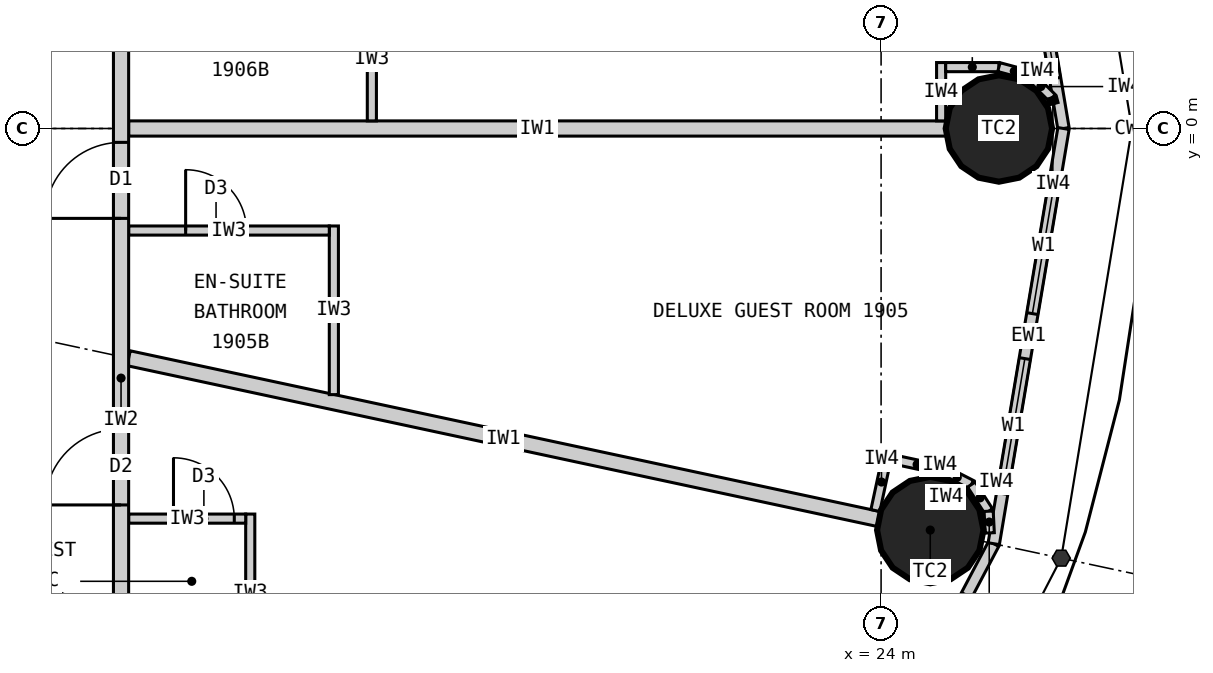
"""IFC4 building model, lengths in metres.
Left out: names, types, materials, properties, quantities, classifications, styles, units other than length and angle.
Written with IfcOpenShell. Run it as: python <this file> out.ifc"""

import sys

from ifc_helpers import new_model, si_unit, direction, frame, frame_2d, origin, origin_2d, place, context, subcontext, project, spatial, rectangle, circle, extrude, element, fill, save


model = new_model("IFC4")
c1 = context("Model", 3, precision=1e-05, world=origin(), true_north=direction((0.0, 1.0)))
c2 = subcontext(c1, "Body", "Model", "MODEL_VIEW")
j1 = project(units=[si_unit("LENGTHUNIT", "METRE"), si_unit("PLANEANGLEUNIT", "RADIAN")], contexts=[c1])
p1 = place(None, origin())
s1 = spatial("IfcSite", under=j1, at=p1, CompositionType="ELEMENT")
p2 = place(p1, origin())
s2 = spatial("IfcBuilding", under=s1, at=p2, CompositionType="ELEMENT")
p3 = place(p2, frame((0.0, 0.0, 77.1)))
s3 = spatial("IfcBuildingStorey", under=s2, at=p3, CompositionType="ELEMENT", Elevation=77.1)
for number, where, z_axis, x_axis in (
    (1, (25.55, 0.0, 0.0), (0.0, 0.0, 1.0), (1.0, 0.0, 0.0)),
    (2, (24.647, -5.283, 0.0), (0.0, 0.0, 1.0), (1.0, 0.0, 0.0)),
):
    element("IfcColumn", number, at=place(p3, frame(where, z_axis=z_axis, x_axis=x_axis)), inside=s3, PredefinedType="COLUMN", context=c2, shape_type="SweptSolid", body=[
        extrude(circle(Radius=0.7, at=origin_2d()), origin(), (0.0, 0.0, 1.0), 3.3),
    ])
p4 = place(p3, frame((26.4, 0.0, 0.0), z_axis=(0.0, 0.0, 1.0), x_axis=(-0.165642551694, 0.986185857264, 0.0)))
e3 = element("IfcWall", 3, at=p4, inside=s3, PredefinedType="ELEMENTEDWALL", context=c2, shape_type="SweptSolid", body=[
    extrude(rectangle(XDim=5.539, YDim=0.15, at=frame_2d((2.77, 0.0))), origin(), (0.0, 0.0, 1.0), 3.12),
])
p5 = place(p4, frame((0.669, 0.0, 0.9)))
e4 = element("IfcOpeningElement", 4, at=p5, cuts=e3, PredefinedType="OPENING", context=c2, shape_type="SweptSolid", body=[
    extrude(rectangle(XDim=1.8, YDim=1.9, at=frame_2d((0.9, 0.95))), frame((0.0, 0.085, 0.0), z_axis=(0.0, -1.0, 0.0), x_axis=(1.0, 0.0, 0.0)), (0.0, 0.0, 1.0), 0.17),
])
p6 = place(p4, frame((3.07, 0.0, 0.9)))
e5 = element("IfcOpeningElement", 5, at=p6, cuts=e3, PredefinedType="OPENING", context=c2, shape_type="SweptSolid", body=[
    extrude(rectangle(XDim=1.8, YDim=1.9, at=frame_2d((0.9, 0.95))), frame((0.0, 0.085, 0.0), z_axis=(0.0, -1.0, 0.0), x_axis=(1.0, 0.0, 0.0)), (0.0, 0.0, 1.0), 0.17),
])
p7 = place(p3, frame((22.803, -10.532, 0.0), z_axis=(0.0, 0.0, 1.0), x_axis=(0.467296867008, 0.884100468321, 0.0)))
e6 = element("IfcWall", 6, at=p7, inside=s3, PredefinedType="ELEMENTEDWALL", context=c2, shape_type="SweptSolid", body=[
    extrude(rectangle(XDim=5.734, YDim=0.15, at=frame_2d((2.867, 0.0))), origin(), (0.0, 0.0, 1.0), 3.12),
])
p8 = place(p7, frame((0.767, 0.0, 0.9)))
e7 = element("IfcOpeningElement", 7, at=p8, cuts=e6, PredefinedType="OPENING", context=c2, shape_type="SweptSolid", body=[
    extrude(rectangle(XDim=1.8, YDim=1.9, at=frame_2d((0.9, 0.95))), frame((0.0, 0.085, 0.0), z_axis=(0.0, -1.0, 0.0), x_axis=(1.0, 0.0, 0.0)), (0.0, 0.0, 1.0), 0.17),
])
p9 = place(p7, frame((3.167, 0.0, 0.9)))
e8 = element("IfcOpeningElement", 8, at=p9, cuts=e6, PredefinedType="OPENING", context=c2, shape_type="SweptSolid", body=[
    extrude(rectangle(XDim=1.8, YDim=1.9, at=frame_2d((0.9, 0.95))), frame((0.0, 0.085, 0.0), z_axis=(0.0, -1.0, 0.0), x_axis=(1.0, 0.0, 0.0)), (0.0, 0.0, 1.0), 0.17),
])
p10 = place(p3, frame((25.482, -5.462, 0.0), z_axis=(0.0, 0.0, 1.0), x_axis=(0.165642551694, 0.986185857264, 0.0)))
e9 = element("IfcWall", 9, at=p10, inside=s3, PredefinedType="ELEMENTEDWALL", context=c2, shape_type="SweptSolid", body=[
    extrude(rectangle(XDim=5.539, YDim=0.15, at=frame_2d((2.77, 0.0))), origin(), (0.0, 0.0, 1.0), 3.12),
])
p11 = place(p10, frame((0.669, 0.0, 0.9)))
e10 = element("IfcOpeningElement", 10, at=p11, cuts=e9, PredefinedType="OPENING", context=c2, shape_type="SweptSolid", body=[
    extrude(rectangle(XDim=1.8, YDim=1.9, at=frame_2d((0.9, 0.95))), frame((0.0, 0.085, 0.0), z_axis=(0.0, -1.0, 0.0), x_axis=(1.0, 0.0, 0.0)), (0.0, 0.0, 1.0), 0.17),
])
p12 = place(p10, frame((3.07, 0.0, 0.9)))
e11 = element("IfcOpeningElement", 11, at=p12, cuts=e9, PredefinedType="OPENING", context=c2, shape_type="SweptSolid", body=[
    extrude(rectangle(XDim=1.8, YDim=1.9, at=frame_2d((0.9, 0.95))), frame((0.0, 0.085, 0.0), z_axis=(0.0, -1.0, 0.0), x_axis=(1.0, 0.0, 0.0)), (0.0, 0.0, 1.0), 0.17),
])
p13 = place(p3, frame((14.1, 0.0, 0.0), z_axis=(0.0, 0.0, 1.0), x_axis=(1.0, 0.0, 0.0)))
e12 = element("IfcWall", 12, at=p13, inside=s3, PredefinedType="PARTITIONING", context=c2, shape_type="SweptSolid", body=[
    extrude(rectangle(XDim=10.75, YDim=0.2, at=frame_2d((5.375, 0.0))), origin(), (0.0, 0.0, 1.0), 2.27),
])
p14 = place(p3, frame((14.1, -3.022, 0.0), z_axis=(0.0, 0.0, 1.0), x_axis=(0.977790014929, -0.209586943072, 0.0)))
e13 = element("IfcWall", 13, at=p14, inside=s3, PredefinedType="PARTITIONING", context=c2, shape_type="SweptSolid", body=[
    extrude(rectangle(XDim=10.087, YDim=0.2, at=frame_2d((5.043, 0.0))), origin(), (0.0, 0.0, 1.0), 2.32),
])
p15 = place(p3, frame((15.7, -7.152, 0.0), z_axis=(0.0, 0.0, 1.0), x_axis=(0.0, 1.0, 0.0)))
e14 = element("IfcWall", 14, at=p15, inside=s3, PredefinedType="PARTITIONING", context=c2, shape_type="SweptSolid", body=[
    extrude(rectangle(XDim=2.079, YDim=0.12, at=frame_2d((1.04, 0.0))), origin(), (0.0, 0.0, 1.0), 3.12),
])
p16 = place(p3, frame((14.1, -5.133, 0.0), z_axis=(0.0, 0.0, 1.0), x_axis=(1.0, 0.0, 0.0)))
e15 = element("IfcWall", 15, at=p16, inside=s3, PredefinedType="PARTITIONING", context=c2, shape_type="SweptSolid", body=[
    extrude(rectangle(XDim=1.54, YDim=0.12, at=frame_2d((0.77, 0.0))), origin(), (0.0, 0.0, 1.0), 3.12),
])
p17 = place(p16, frame((0.59, 0.0, 0.0)))
e16 = element("IfcOpeningElement", 16, at=p17, cuts=e15, PredefinedType="OPENING", context=c2, shape_type="SweptSolid", body=[
    extrude(rectangle(XDim=0.8, YDim=2.1, at=frame_2d((0.4, 1.05))), frame((0.0, 0.07, 0.0), z_axis=(0.0, -1.0, 0.0), x_axis=(1.0, 0.0, 0.0)), (0.0, 0.0, 1.0), 0.14),
])
p18 = place(p3, frame((16.8, -3.501, 0.0), z_axis=(0.0, 0.0, 1.0), x_axis=(0.0, 1.0, 0.0)))
e17 = element("IfcWall", 17, at=p18, inside=s3, PredefinedType="PARTITIONING", context=c2, shape_type="SweptSolid", body=[
    extrude(rectangle(XDim=2.219, YDim=0.12, at=frame_2d((1.109, 0.0))), origin(), (0.0, 0.0, 1.0), 3.12),
])
p19 = place(p3, frame((14.1, -1.343, 0.0), z_axis=(0.0, 0.0, 1.0), x_axis=(1.0, 0.0, 0.0)))
e18 = element("IfcWall", 18, at=p19, inside=s3, PredefinedType="PARTITIONING", context=c2, shape_type="SweptSolid", body=[
    extrude(rectangle(XDim=2.64, YDim=0.12, at=frame_2d((1.32, 0.0))), origin(), (0.0, 0.0, 1.0), 3.12),
])
p20 = place(p19, frame((0.75, 0.0, 0.0)))
e19 = element("IfcOpeningElement", 19, at=p20, cuts=e18, PredefinedType="OPENING", context=c2, shape_type="SweptSolid", body=[
    extrude(rectangle(XDim=0.8, YDim=2.1, at=frame_2d((0.4, 1.05))), frame((0.0, 0.07, 0.0), z_axis=(0.0, -1.0, 0.0), x_axis=(1.0, 0.0, 0.0)), (0.0, 0.0, 1.0), 0.14),
])
p21 = place(p3, frame((17.3, 0.1, 0.0), z_axis=(0.0, 0.0, 1.0), x_axis=(0.0, 1.0, 0.0)))
e20 = element("IfcWall", 20, at=p21, inside=s3, PredefinedType="PARTITIONING", context=c2, shape_type="SweptSolid", body=[
    extrude(rectangle(XDim=1.64, YDim=0.12, at=frame_2d((0.82, 0.0))), origin(), (0.0, 0.0, 1.0), 3.12),
])
p22 = place(p3, frame((14.0, -9.9, 0.0), z_axis=(0.0, 0.0, 1.0), x_axis=(0.0, 1.0, 0.0)))
e21 = element("IfcWall", 21, at=p22, inside=s3, PredefinedType="PARTITIONING", context=c2, shape_type="SweptSolid", body=[
    extrude(rectangle(XDim=13.232, YDim=0.2, at=frame_2d((6.616, 0.0))), origin(), (0.0, 0.0, 1.0), 3.12),
])
p23 = place(p22, frame((4.948, 0.0, 0.0)))
e22 = element("IfcOpeningElement", 22, at=p23, cuts=e21, PredefinedType="OPENING", context=c2, shape_type="SweptSolid", body=[
    extrude(rectangle(XDim=1.0, YDim=2.2, at=frame_2d((0.5, 1.1))), frame((0.0, 0.11, 0.0), z_axis=(0.0, -1.0, 0.0), x_axis=(1.0, 0.0, 0.0)), (0.0, 0.0, 1.0), 0.22),
])
p24 = place(p22, frame((8.718, 0.0, 0.0)))
e23 = element("IfcOpeningElement", 23, at=p24, cuts=e21, PredefinedType="OPENING", context=c2, shape_type="SweptSolid", body=[
    extrude(rectangle(XDim=1.0, YDim=2.2, at=frame_2d((0.5, 1.1))), frame((0.0, 0.11, 0.0), z_axis=(0.0, -1.0, 0.0), x_axis=(1.0, 0.0, 0.0)), (0.0, 0.0, 1.0), 0.22),
])
p25 = place(p22, frame((11.74, 0.0, 0.0)))
e24 = element("IfcOpeningElement", 24, at=p25, cuts=e21, PredefinedType="OPENING", context=c2, shape_type="SweptSolid", body=[
    extrude(rectangle(XDim=1.0, YDim=2.2, at=frame_2d((0.5, 1.1))), frame((0.0, 0.11, 0.0), z_axis=(0.0, -1.0, 0.0), x_axis=(1.0, 0.0, 0.0)), (0.0, 0.0, 1.0), 0.22),
])
p26 = place(p3, frame((24.79, 0.1, 0.0), z_axis=(0.0, 0.0, 1.0), x_axis=(0.0, 1.0, 0.0)))
e25 = element("IfcWall", 25, at=p26, inside=s3, PredefinedType="PARTITIONING", context=c2, shape_type="SweptSolid", body=[
    extrude(rectangle(XDim=0.767, YDim=0.12, at=frame_2d((0.384, 0.0))), origin(), (0.0, 0.0, 1.0), 3.12),
])
p27 = place(p3, frame((24.85, 0.808, 0.0), z_axis=(0.0, 0.0, 1.0), x_axis=(1.0, 0.0, 0.0)))
e26 = element("IfcWall", 26, at=p27, inside=s3, PredefinedType="PARTITIONING", context=c2, shape_type="SweptSolid", body=[
    extrude(rectangle(XDim=0.7, YDim=0.12, at=frame_2d((0.35, 0.0))), origin(), (0.0, 0.0, 1.0), 3.12),
])
p28 = place(p3, frame((25.55, 0.808, 0.0), z_axis=(0.0, 0.0, 1.0), x_axis=(0.965807183573, -0.2592614205, 0.0)))
e27 = element("IfcWall", 27, at=p28, inside=s3, PredefinedType="PARTITIONING", context=c2, shape_type="SweptSolid", body=[
    extrude(rectangle(XDim=0.418, YDim=0.12, at=frame_2d((0.209, 0.0))), origin(), (0.0, 0.0, 1.0), 3.12),
])
p29 = place(p3, frame((25.954, 0.699, 0.0), z_axis=(0.0, 0.0, 1.0), x_axis=(0.707106781187, -0.707106781187, 0.0)))
e28 = element("IfcWall", 28, at=p29, inside=s3, PredefinedType="PARTITIONING", context=c2, shape_type="SweptSolid", body=[
    extrude(rectangle(XDim=0.418, YDim=0.12, at=frame_2d((0.209, 0.0))), origin(), (0.0, 0.0, 1.0), 3.12),
])
p30 = place(p3, frame((26.249, 0.404, 0.0), z_axis=(0.0, 0.0, 1.0), x_axis=(0.259754282609, -0.965674744759, 0.0)))
e29 = element("IfcWall", 29, at=p30, inside=s3, PredefinedType="PARTITIONING", context=c2, shape_type="SweptSolid", body=[
    extrude(rectangle(XDim=0.08, YDim=0.12, at=frame_2d((0.04, 0.0))), origin(), (0.0, 0.0, 1.0), 3.12),
])
p31 = place(p3, frame((23.925, -5.026, 0.0), z_axis=(0.0, 0.0, 1.0), x_axis=(0.209681192172, 0.977769808109, 0.0)))
e30 = element("IfcWall", 30, at=p31, inside=s3, PredefinedType="PARTITIONING", context=c2, shape_type="SweptSolid", body=[
    extrude(rectangle(XDim=0.767, YDim=0.12, at=frame_2d((0.384, 0.0))), origin(), (0.0, 0.0, 1.0), 3.12),
])
p32 = place(p3, frame((24.132, -4.347, 0.0), z_axis=(0.0, 0.0, 1.0), x_axis=(0.977776882509, -0.209648200638, 0.0)))
e31 = element("IfcWall", 31, at=p32, inside=s3, PredefinedType="PARTITIONING", context=c2, shape_type="SweptSolid", body=[
    extrude(rectangle(XDim=0.7, YDim=0.12, at=frame_2d((0.35, 0.0))), origin(), (0.0, 0.0, 1.0), 3.12),
])
for number, where, z_axis, x_axis in (
    (32, (24.816, -4.494, 0.0), (0.0, 0.0, 1.0), (0.89, -0.455, 0.0)),
    (33, (25.188, -4.684, 0.0), (0.0, 0.0, 1.0), (0.543, -0.84, 0.0)),
):
    element("IfcWall", number, at=place(p3, frame(where, z_axis=z_axis, x_axis=x_axis)), inside=s3, PredefinedType="PARTITIONING", context=c2, shape_type="SweptSolid", body=[
        extrude(rectangle(XDim=0.418, YDim=0.12, at=frame_2d((0.209, 0.0))), origin(), (0.0, 0.0, 1.0), 3.12),
    ])
p33 = place(p3, frame((25.416, -5.035, 0.0), z_axis=(0.0, 0.0, 1.0), x_axis=(0.050406329159, -0.998728793007, 0.0)))
e34 = element("IfcWall", 34, at=p33, inside=s3, PredefinedType="PARTITIONING", context=c2, shape_type="SweptSolid", body=[
    extrude(rectangle(XDim=0.286, YDim=0.12, at=frame_2d((0.143, 0.0))), origin(), (0.0, 0.0, 1.0), 3.12),
])
p34 = place(p5, origin())
e35 = element("IfcWindow", 35, at=p34, inside=s3, PartitioningType="SINGLE_PANEL", PredefinedType="WINDOW", context=c2, shape_type="SweptSolid", body=[
    extrude(rectangle(XDim=1.8, YDim=1.9, at=frame_2d((0.9, 0.95))), frame((0.0, 0.03, 0.0), z_axis=(0.0, -1.0, 0.0), x_axis=(1.0, 0.0, 0.0)), (0.0, 0.0, 1.0), 0.06),
])
fill(e4, e35)
p35 = place(p11, origin())
e36 = element("IfcWindow", 36, at=p35, inside=s3, PartitioningType="SINGLE_PANEL", PredefinedType="WINDOW", context=c2, shape_type="SweptSolid", body=[
    extrude(rectangle(XDim=1.8, YDim=1.9, at=frame_2d((0.9, 0.95))), frame((0.0, 0.03, 0.0), z_axis=(0.0, -1.0, 0.0), x_axis=(1.0, 0.0, 0.0)), (0.0, 0.0, 1.0), 0.06),
])
fill(e10, e36)
p36 = place(p12, origin())
e37 = element("IfcWindow", 37, at=p36, inside=s3, PartitioningType="SINGLE_PANEL", PredefinedType="WINDOW", context=c2, shape_type="SweptSolid", body=[
    extrude(rectangle(XDim=1.8, YDim=1.9, at=frame_2d((0.9, 0.95))), frame((0.0, 0.03, 0.0), z_axis=(0.0, -1.0, 0.0), x_axis=(1.0, 0.0, 0.0)), (0.0, 0.0, 1.0), 0.06),
])
fill(e11, e37)
p37 = place(p17, origin())
e38 = element("IfcDoor", 38, at=p37, inside=s3, OperationType="SINGLE_SWING_LEFT", PredefinedType="DOOR", context=c2, shape_type="SweptSolid", body=[
    extrude(rectangle(XDim=0.8, YDim=2.1, at=frame_2d((0.4, 1.05))), frame((0.0, 0.025, 0.0), z_axis=(0.0, -1.0, 0.0), x_axis=(1.0, 0.0, 0.0)), (0.0, 0.0, 1.0), 0.05),
])
fill(e16, e38)
p38 = place(p23, origin())
e39 = element("IfcDoor", 39, at=p38, inside=s3, OperationType="SINGLE_SWING_LEFT", PredefinedType="DOOR", context=c2, shape_type="SweptSolid", body=[
    extrude(rectangle(XDim=1.0, YDim=2.2, at=frame_2d((0.5, 1.1))), frame((0.0, 0.025, 0.0), z_axis=(0.0, -1.0, 0.0), x_axis=(1.0, 0.0, 0.0)), (0.0, 0.0, 1.0), 0.05),
])
fill(e22, e39)
p39 = place(p20, origin())
e40 = element("IfcDoor", 40, at=p39, inside=s3, OperationType="SINGLE_SWING_LEFT", PredefinedType="DOOR", context=c2, shape_type="SweptSolid", body=[
    extrude(rectangle(XDim=0.8, YDim=2.1, at=frame_2d((0.4, 1.05))), frame((0.0, 0.025, 0.0), z_axis=(0.0, -1.0, 0.0), x_axis=(1.0, 0.0, 0.0)), (0.0, 0.0, 1.0), 0.05),
])
fill(e19, e40)
p40 = place(p24, origin())
e41 = element("IfcDoor", 41, at=p40, inside=s3, OperationType="SINGLE_SWING_LEFT", PredefinedType="DOOR", context=c2, shape_type="SweptSolid", body=[
    extrude(rectangle(XDim=1.0, YDim=2.2, at=frame_2d((0.5, 1.1))), frame((0.0, 0.025, 0.0), z_axis=(0.0, -1.0, 0.0), x_axis=(1.0, 0.0, 0.0)), (0.0, 0.0, 1.0), 0.05),
])
fill(e23, e41)
save(model, sys.argv[1])
